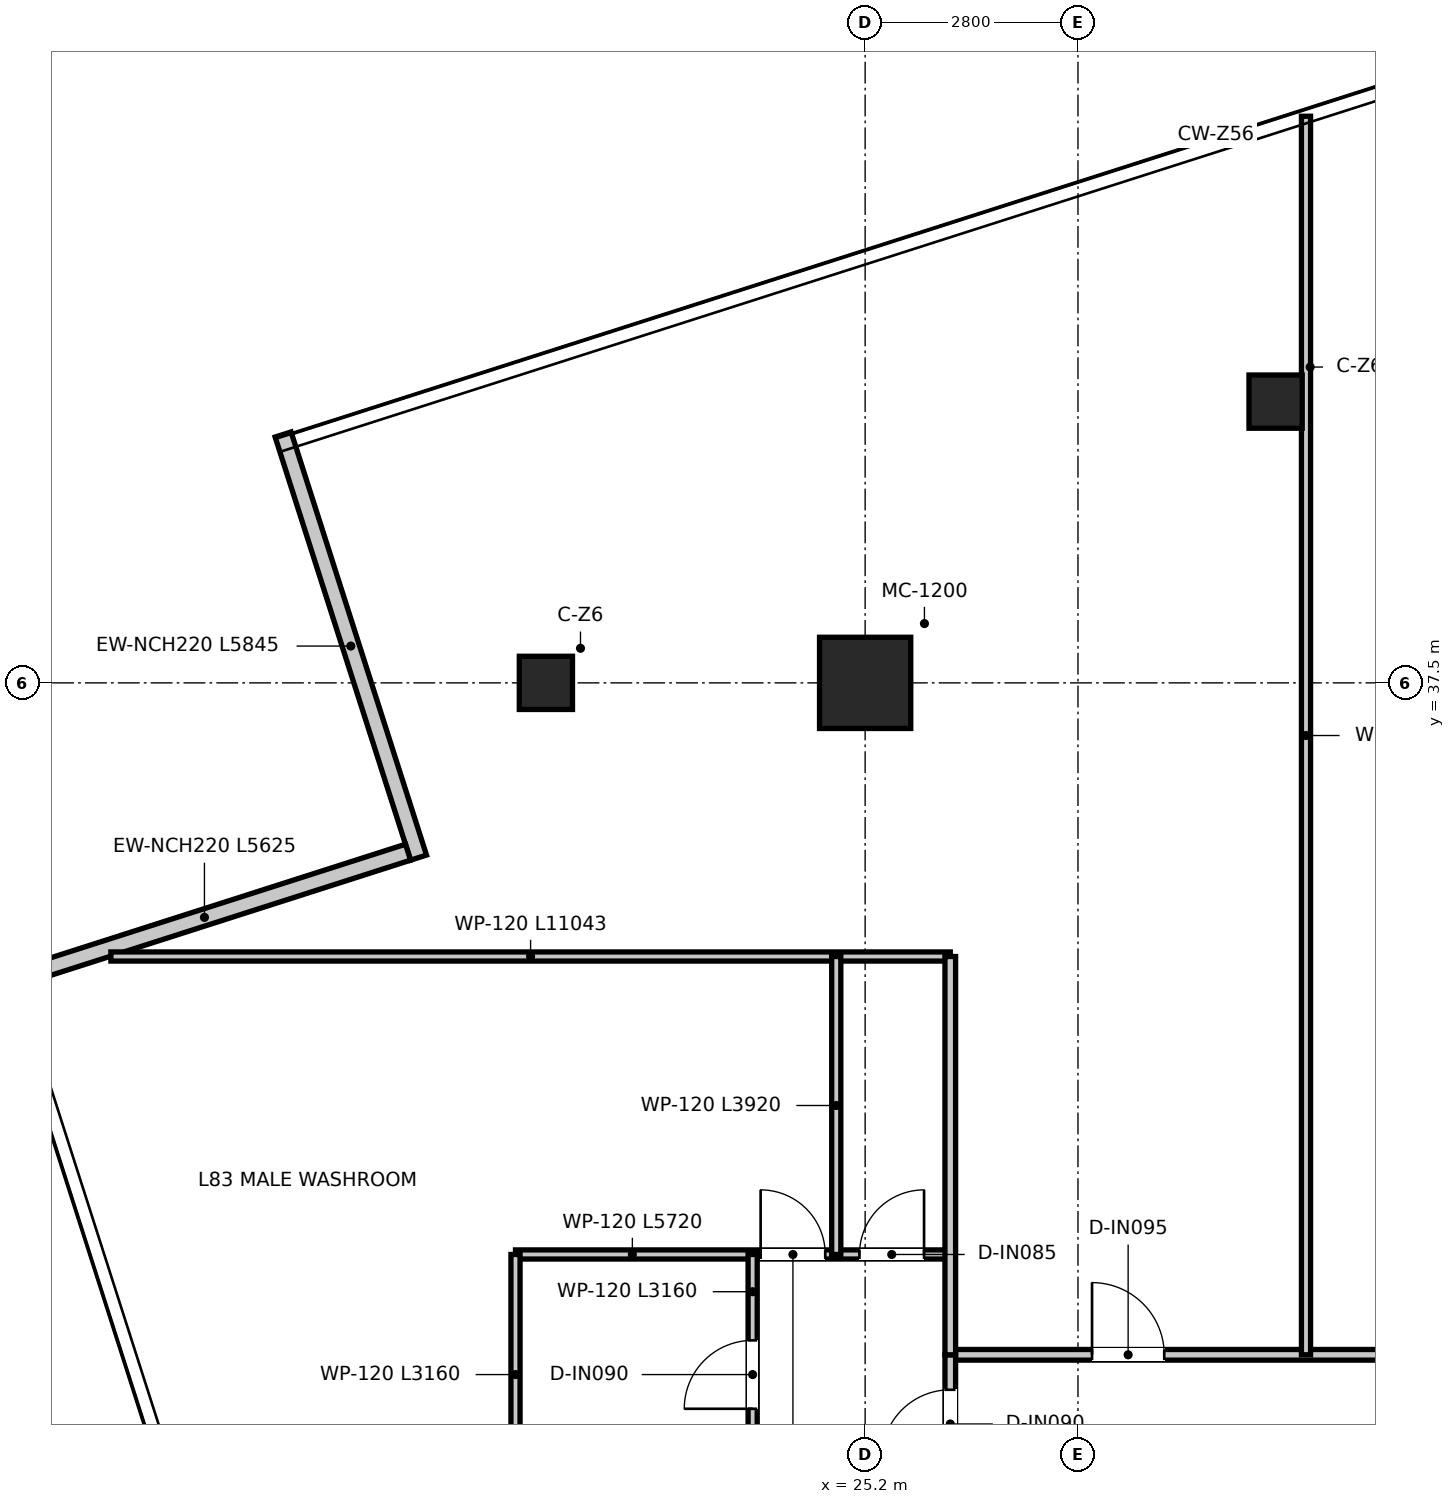
"""IFC4 building model, lengths in metres.
Left out: names, types, materials, properties, quantities, classifications, styles, units other than length and angle.
Written with IfcOpenShell. Run it as: python <this file> out.ifc"""

import sys

from ifc_helpers import new_model, si_unit, direction, frame, frame_2d, origin, origin_2d, place, context, subcontext, project, spatial, rectangle, extrude, source, transform, mapped, element, fill, save


model = new_model("IFC4")
c1 = context("Model", 3, precision=1e-05, world=origin(), true_north=direction((0.0, 1.0)))
c2 = subcontext(c1, "Body", "Model", "MODEL_VIEW")
j1 = project(units=[si_unit("LENGTHUNIT", "METRE"), si_unit("PLANEANGLEUNIT", "RADIAN")], contexts=[c1])
p1 = place(None, origin())
s1 = spatial("IfcSite", under=j1, at=p1, CompositionType="ELEMENT")
p2 = place(p1, origin())
s2 = spatial("IfcBuilding", under=s1, at=p2, CompositionType="ELEMENT")
p3 = place(p2, frame((0.0, 0.0, 339.55)))
s3 = spatial("IfcBuildingStorey", under=s2, at=p3, CompositionType="ELEMENT", Elevation=339.55)
m1 = source(origin(), c2, "Body", "SweptSolid", [
    extrude(rectangle(XDim=1.2, YDim=1.2, at=origin_2d()), origin(), (0.0, 0.0, 1.0), 3.95),
])
p4 = place(p3, frame((25.2, 37.5, 0.0), z_axis=(0.0, 0.0, 1.0), x_axis=(1.0, 0.0, 0.0)))
e1 = element("IfcColumn", 1, at=p4, inside=s3, PredefinedType="USERDEFINED", context=c2, shape_type="MappedRepresentation", body=[
    mapped(m1, transform((0.0, 0.0, 0.0), x_axis=(1.0, 0.0, 0.0), y_axis=(0.0, 1.0, 0.0), z_axis=(0.0, 0.0, 1.0), scale=1.0)),
])
m2 = source(origin(), c2, "Body", "SweptSolid", [
    extrude(rectangle(XDim=0.7, YDim=0.7, at=origin_2d()), origin(), (0.0, 0.0, 1.0), 3.95),
])
for number, where, z_axis, x_axis in (
    (2, (21.0, 37.5, 0.0), (0.0, 0.0, 1.0), (1.0, 0.0, 0.0)),
    (3, (30.6, 41.2, 0.0), (0.0, 0.0, 1.0), (1.0, 0.0, 0.0)),
):
    element("IfcColumn", number, at=place(p3, frame(where, z_axis=z_axis, x_axis=x_axis)), inside=s3, PredefinedType="COLUMN", context=c2, shape_type="MappedRepresentation", body=[
        mapped(m2, transform((0.0, 0.0, 0.0), x_axis=(1.0, 0.0, 0.0), y_axis=(0.0, 1.0, 0.0), z_axis=(0.0, 0.0, 1.0), scale=1.0)),
    ])
p5 = place(p3, frame((17.543, 40.768, 0.0), z_axis=(0.0, 0.0, 1.0), x_axis=(0.304839382122, -0.952403775248, 0.0)))
e4 = element("IfcWall", 4, at=p5, inside=s3, PredefinedType="ELEMENTEDWALL", context=c2, shape_type="SweptSolid", body=[
    extrude(rectangle(XDim=5.845, YDim=0.22, at=frame_2d((2.922, 0.0))), origin(), (0.0, 0.0, 1.0), 3.67),
])
p6 = place(p3, frame((19.186, 35.272, 0.0), z_axis=(0.0, 0.0, 1.0), x_axis=(-0.952395921602, -0.30486391803, 0.0)))
e5 = element("IfcWall", 5, at=p6, inside=s3, PredefinedType="ELEMENTEDWALL", context=c2, shape_type="SweptSolid", body=[
    extrude(rectangle(XDim=5.625, YDim=0.22, at=frame_2d((2.812, 0.0))), origin(), (0.0, 0.0, 1.0), 3.67),
])
p7 = place(p3, frame((26.32, 28.66, 0.0), z_axis=(0.0, 0.0, 1.0), x_axis=(1.0, 0.0, 0.0)))
e6 = element("IfcWall", 6, at=p7, inside=s3, PredefinedType="PARTITIONING", context=c2, shape_type="SweptSolid", body=[
    extrude(rectangle(XDim=19.36, YDim=0.14, at=frame_2d((9.68, 0.0))), origin(), (0.0, 0.0, 1.0), 3.18),
])
p8 = place(p7, frame((1.865, 0.0, 0.0)))
e7 = element("IfcOpeningElement", 7, at=p8, cuts=e6, PredefinedType="OPENING", context=c2, shape_type="SweptSolid", body=[
    extrude(rectangle(XDim=0.95, YDim=2.1, at=frame_2d((0.475, 1.05))), frame((0.0, 0.08, 0.0), z_axis=(0.0, -1.0, 0.0), x_axis=(1.0, 0.0, 0.0)), (0.0, 0.0, 1.0), 0.16),
])
p9 = place(p7, frame((8.205, 0.0, 0.0)))
e8 = element("IfcOpeningElement", 8, at=p9, cuts=e6, PredefinedType="OPENING", context=c2, shape_type="SweptSolid", body=[
    extrude(rectangle(XDim=0.95, YDim=2.1, at=frame_2d((0.475, 1.05))), frame((0.0, 0.08, 0.0), z_axis=(0.0, -1.0, 0.0), x_axis=(1.0, 0.0, 0.0)), (0.0, 0.0, 1.0), 0.16),
])
p10 = place(p7, frame((15.545, 0.0, 0.0)))
e9 = element("IfcOpeningElement", 9, at=p10, cuts=e6, PredefinedType="OPENING", context=c2, shape_type="SweptSolid", body=[
    extrude(rectangle(XDim=0.95, YDim=2.1, at=frame_2d((0.475, 1.05))), frame((0.0, 0.08, 0.0), z_axis=(0.0, -1.0, 0.0), x_axis=(1.0, 0.0, 0.0)), (0.0, 0.0, 1.0), 0.16),
])
p11 = place(p3, frame((26.32, 13.0, 0.0), z_axis=(0.0, 0.0, 1.0), x_axis=(0.0, 1.0, 0.0)))
e10 = element("IfcWall", 10, at=p11, inside=s3, PredefinedType="PARTITIONING", context=c2, shape_type="SweptSolid", body=[
    extrude(rectangle(XDim=15.66, YDim=0.14, at=frame_2d((7.83, 0.0))), origin(), (0.0, 0.0, 1.0), 3.13),
])
p12 = place(p11, frame((14.3, 0.0, 0.0)))
e11 = element("IfcOpeningElement", 11, at=p12, cuts=e10, PredefinedType="OPENING", context=c2, shape_type="SweptSolid", body=[
    extrude(rectangle(XDim=0.9, YDim=2.1, at=frame_2d((0.45, 1.05))), frame((0.0, 0.08, 0.0), z_axis=(0.0, -1.0, 0.0), x_axis=(1.0, 0.0, 0.0)), (0.0, 0.0, 1.0), 0.16),
])
p13 = place(p11, frame((5.3, 0.0, 0.0)))
e12 = element("IfcOpeningElement", 12, at=p13, cuts=e10, PredefinedType="OPENING", context=c2, shape_type="SweptSolid", body=[
    extrude(rectangle(XDim=0.9, YDim=2.1, at=frame_2d((0.45, 1.05))), frame((0.0, 0.08, 0.0), z_axis=(0.0, -1.0, 0.0), x_axis=(1.0, 0.0, 0.0)), (0.0, 0.0, 1.0), 0.16),
])
p14 = place(p11, frame((9.96, 0.0, 0.0)))
e13 = element("IfcOpeningElement", 13, at=p14, cuts=e10, PredefinedType="OPENING", context=c2, shape_type="SweptSolid", body=[
    extrude(rectangle(XDim=0.9, YDim=2.1, at=frame_2d((0.45, 1.05))), frame((0.0, 0.08, 0.0), z_axis=(0.0, -1.0, 0.0), x_axis=(1.0, 0.0, 0.0)), (0.0, 0.0, 1.0), 0.16),
])
p15 = place(p3, frame((15.277, 33.9, 0.0), z_axis=(0.0, 0.0, 1.0), x_axis=(1.0, 0.0, 0.0)))
e14 = element("IfcWall", 14, at=p15, inside=s3, PredefinedType="PARTITIONING", context=c2, shape_type="SweptSolid", body=[
    extrude(rectangle(XDim=11.043, YDim=0.12, at=frame_2d((5.521, 0.0))), origin(), (0.0, 0.0, 1.0), 3.13),
])
p16 = place(p3, frame((20.6, 29.98, 0.0), z_axis=(0.0, 0.0, 1.0), x_axis=(1.0, 0.0, 0.0)))
e15 = element("IfcWall", 15, at=p16, inside=s3, PredefinedType="PARTITIONING", context=c2, shape_type="SweptSolid", body=[
    extrude(rectangle(XDim=5.72, YDim=0.12, at=frame_2d((2.86, 0.0))), origin(), (0.0, 0.0, 1.0), 3.13),
])
p17 = place(p16, frame((3.225, 0.0, 0.0)))
e16 = element("IfcOpeningElement", 16, at=p17, cuts=e15, PredefinedType="OPENING", context=c2, shape_type="SweptSolid", body=[
    extrude(rectangle(XDim=0.85, YDim=2.1, at=frame_2d((0.425, 1.05))), frame((0.0, 0.07, 0.0), z_axis=(0.0, -1.0, 0.0), x_axis=(1.0, 0.0, 0.0)), (0.0, 0.0, 1.0), 0.14),
])
p18 = place(p16, frame((4.525, 0.0, 0.0)))
e17 = element("IfcOpeningElement", 17, at=p18, cuts=e15, PredefinedType="OPENING", context=c2, shape_type="SweptSolid", body=[
    extrude(rectangle(XDim=0.85, YDim=2.1, at=frame_2d((0.425, 1.05))), frame((0.0, 0.07, 0.0), z_axis=(0.0, -1.0, 0.0), x_axis=(1.0, 0.0, 0.0)), (0.0, 0.0, 1.0), 0.14),
])
p19 = place(p3, frame((20.6, 26.82, 0.0), z_axis=(0.0, 0.0, 1.0), x_axis=(0.0, 1.0, 0.0)))
e18 = element("IfcWall", 18, at=p19, inside=s3, PredefinedType="PARTITIONING", context=c2, shape_type="SweptSolid", body=[
    extrude(rectangle(XDim=3.16, YDim=0.12, at=frame_2d((1.58, 0.0))), origin(), (0.0, 0.0, 1.0), 3.67),
])
p20 = place(p3, frame((23.72, 26.82, 0.0), z_axis=(0.0, 0.0, 1.0), x_axis=(0.0, 1.0, 0.0)))
e19 = element("IfcWall", 19, at=p20, inside=s3, PredefinedType="PARTITIONING", context=c2, shape_type="SweptSolid", body=[
    extrude(rectangle(XDim=3.16, YDim=0.12, at=frame_2d((1.58, 0.0))), origin(), (0.0, 0.0, 1.0), 3.18),
])
p21 = place(p20, frame((1.13, 0.0, 0.0)))
e20 = element("IfcOpeningElement", 20, at=p21, cuts=e19, PredefinedType="OPENING", context=c2, shape_type="SweptSolid", body=[
    extrude(rectangle(XDim=0.9, YDim=2.1, at=frame_2d((0.45, 1.05))), frame((0.0, 0.07, 0.0), z_axis=(0.0, -1.0, 0.0), x_axis=(1.0, 0.0, 0.0)), (0.0, 0.0, 1.0), 0.14),
])
p22 = place(p3, frame((24.82, 29.98, 0.0), z_axis=(0.0, 0.0, 1.0), x_axis=(0.0, 1.0, 0.0)))
e21 = element("IfcWall", 21, at=p22, inside=s3, PredefinedType="PARTITIONING", context=c2, shape_type="SweptSolid", body=[
    extrude(rectangle(XDim=3.92, YDim=0.12, at=frame_2d((1.96, 0.0))), origin(), (0.0, 0.0, 1.0), 3.37),
])
p23 = place(p3, frame((26.32, 28.66, 0.0), z_axis=(0.0, 0.0, 1.0), x_axis=(0.0, 1.0, 0.0)))
e22 = element("IfcWall", 22, at=p23, inside=s3, PredefinedType="PARTITIONING", context=c2, shape_type="SweptSolid", body=[
    extrude(rectangle(XDim=5.24, YDim=0.14, at=frame_2d((2.62, 0.0))), origin(), (0.0, 0.0, 1.0), 3.43),
])
p24 = place(p3, frame((31.0, 28.66, 0.0), z_axis=(0.0, 0.0, 1.0), x_axis=(0.0, 1.0, 0.0)))
e23 = element("IfcWall", 23, at=p24, inside=s3, PredefinedType="PARTITIONING", context=c2, shape_type="SweptSolid", body=[
    extrude(rectangle(XDim=16.295, YDim=0.12, at=frame_2d((8.147, 0.0))), origin(), (0.0, 0.0, 1.0), 3.13),
])
p25 = place(p12, origin())
e24 = element("IfcDoor", 24, at=p25, inside=s3, OperationType="SINGLE_SWING_LEFT", PredefinedType="DOOR", context=c2, shape_type="SweptSolid", body=[
    extrude(rectangle(XDim=0.9, YDim=2.1, at=frame_2d((0.45, 1.05))), frame((0.0, 0.025, 0.0), z_axis=(0.0, -1.0, 0.0), x_axis=(1.0, 0.0, 0.0)), (0.0, 0.0, 1.0), 0.05),
])
fill(e11, e24)
p26 = place(p17, origin())
e25 = element("IfcDoor", 25, at=p26, inside=s3, OperationType="SINGLE_SWING_LEFT", PredefinedType="DOOR", context=c2, shape_type="SweptSolid", body=[
    extrude(rectangle(XDim=0.85, YDim=2.1, at=frame_2d((0.425, 1.05))), frame((0.0, 0.025, 0.0), z_axis=(0.0, -1.0, 0.0), x_axis=(1.0, 0.0, 0.0)), (0.0, 0.0, 1.0), 0.05),
])
fill(e16, e25)
p27 = place(p18, origin())
e26 = element("IfcDoor", 26, at=p27, inside=s3, OperationType="SINGLE_SWING_RIGHT", PredefinedType="DOOR", context=c2, shape_type="SweptSolid", body=[
    extrude(rectangle(XDim=0.85, YDim=2.1, at=frame_2d((0.425, 1.05))), frame((0.0, 0.025, 0.0), z_axis=(0.0, -1.0, 0.0), x_axis=(1.0, 0.0, 0.0)), (0.0, 0.0, 1.0), 0.05),
])
fill(e17, e26)
p28 = place(p21, origin())
e27 = element("IfcDoor", 27, at=p28, inside=s3, OperationType="SINGLE_SWING_LEFT", PredefinedType="DOOR", context=c2, shape_type="SweptSolid", body=[
    extrude(rectangle(XDim=0.9, YDim=2.1, at=frame_2d((0.45, 1.05))), frame((0.0, 0.025, 0.0), z_axis=(0.0, -1.0, 0.0), x_axis=(1.0, 0.0, 0.0)), (0.0, 0.0, 1.0), 0.05),
])
fill(e20, e27)
p29 = place(p8, origin())
e28 = element("IfcDoor", 28, at=p29, inside=s3, OperationType="SINGLE_SWING_LEFT", PredefinedType="DOOR", context=c2, shape_type="SweptSolid", body=[
    extrude(rectangle(XDim=0.95, YDim=2.1, at=frame_2d((0.475, 1.05))), frame((0.0, 0.025, 0.0), z_axis=(0.0, -1.0, 0.0), x_axis=(1.0, 0.0, 0.0)), (0.0, 0.0, 1.0), 0.05),
])
fill(e7, e28)
save(model, sys.argv[1])
